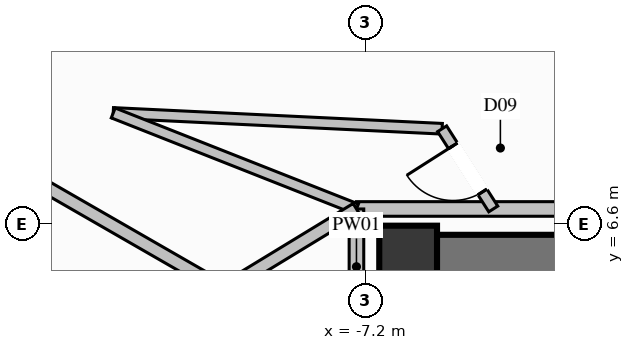
"""IFC4 building model, lengths in metres.
Left out: names, types, materials, properties, quantities, classifications, styles, units other than length and angle.
Written with IfcOpenShell. Run it as: python <this file> out.ifc"""

import sys

from ifc_helpers import new_model, si_unit, direction, frame, frame_2d, origin, origin_2d, place, context, subcontext, project, spatial, rectangle, extrude, element, fill, save


model = new_model("IFC4")
c1 = context("Model", 3, precision=1e-05, world=origin(), true_north=direction((0.0, 1.0)))
c2 = subcontext(c1, "Body", "Model", "MODEL_VIEW")
j1 = project(units=[si_unit("LENGTHUNIT", "METRE"), si_unit("PLANEANGLEUNIT", "RADIAN")], contexts=[c1])
p1 = place(None, origin())
s1 = spatial("IfcSite", under=j1, at=p1, CompositionType="ELEMENT")
p2 = place(p1, origin())
s2 = spatial("IfcBuilding", under=s1, at=p2, CompositionType="ELEMENT")
p3 = place(p2, frame((0.0, 0.0, 117.0)))
s3 = spatial("IfcBuildingStorey", under=s2, at=p3, CompositionType="ELEMENT", Elevation=117.0)
p4 = place(p3, frame((-6.5, 6.1, 0.0), z_axis=(0.0, 0.0, 1.0), x_axis=(1.0, 0.0, 0.0)))
e1 = element("IfcColumn", 1, at=p4, inside=s3, PredefinedType="COLUMN", context=c2, shape_type="SweptSolid", body=[
    extrude(rectangle(XDim=0.95, YDim=0.95, at=origin_2d()), origin(), (0.0, 0.0, 1.0), 3.6),
])
p5 = place(p3, frame((-6.175, 6.1, 0.0), z_axis=(0.0, 0.0, 1.0), x_axis=(1.0, 0.0, 0.0)))
e2 = element("IfcWall", 2, at=p5, inside=s3, PredefinedType="SHEAR", context=c2, shape_type="SweptSolid", body=[
    extrude(rectangle(XDim=2.575, YDim=0.65, at=frame_2d((1.288, 0.0))), origin(), (0.0, 0.0, 1.0), 3.6),
])
p6 = place(p3, frame((-6.5, 2.35, 0.0), z_axis=(0.0, 0.0, 1.0), x_axis=(0.0, 1.0, 0.0)))
e3 = element("IfcWall", 3, at=p6, inside=s3, PredefinedType="SHEAR", context=c2, shape_type="SweptSolid", body=[
    extrude(rectangle(XDim=4.075, YDim=0.65, at=frame_2d((2.038, 0.0))), origin(), (0.0, 0.0, 1.0), 3.6),
])
p7 = place(p3, frame((-7.35, 6.85, 0.0), z_axis=(0.0, 0.0, 1.0), x_axis=(1.0, 0.0, 0.0)))
e4 = element("IfcWall", 4, at=p7, inside=s3, PredefinedType="PARTITIONING", context=c2, shape_type="SweptSolid", body=[
    extrude(rectangle(XDim=14.7, YDim=0.24, at=frame_2d((7.35, 0.0))), origin(), (0.0, 0.0, 1.0), 2.435),
])
p8 = place(p3, frame((-7.35, 4.95, 0.0), z_axis=(0.0, 0.0, 1.0), x_axis=(0.0, 1.0, 0.0)))
e5 = element("IfcWall", 5, at=p8, inside=s3, PredefinedType="PARTITIONING", context=c2, shape_type="SweptSolid", body=[
    extrude(rectangle(XDim=1.9, YDim=0.24, at=frame_2d((0.95, 0.0))), origin(), (0.0, 0.0, 1.0), 2.435),
])
p9 = place(p3, frame((-9.526, 5.525, 0.0), z_axis=(0.0, 0.0, 1.0), x_axis=(-0.866806949329, 0.498643873516, 0.0)))
e6 = element("IfcWall", 6, at=p9, inside=s3, PredefinedType="PARTITIONING", context=c2, shape_type="SweptSolid", body=[
    extrude(rectangle(XDim=5.443, YDim=0.21, at=frame_2d((2.721, 0.0))), origin(), (0.0, 0.0, 1.0), 2.791),
])
p10 = place(p3, frame((-11.35, 8.429, 0.0), z_axis=(0.0, 0.0, 1.0), x_axis=(0.998846720144, -0.048012807228, 0.0)))
e7 = element("IfcWall", 7, at=p10, inside=s3, PredefinedType="PLUMBINGWALL", context=c2, shape_type="SweptSolid", body=[
    extrude(rectangle(XDim=5.416, YDim=0.175, at=frame_2d((2.708, 0.0))), origin(), (0.0, 0.0, 1.0), 3.35),
])
p11 = place(p3, frame((-11.35, 8.429, 0.0), z_axis=(0.0, 0.0, 1.0), x_axis=(0.930162364503, -0.367148438186, 0.0)))
e8 = element("IfcWall", 8, at=p11, inside=s3, PredefinedType="PLUMBINGWALL", context=c2, shape_type="SweptSolid", body=[
    extrude(rectangle(XDim=4.3, YDim=0.175, at=frame_2d((2.15, 0.0))), origin(), (0.0, 0.0, 1.0), 2.791),
])
p12 = place(p3, frame((-5.1, 6.85, 0.0), z_axis=(0.0, 0.0, 1.0), x_axis=(-0.537582310539, 0.843211278029, 0.0)))
e9 = element("IfcWall", 9, at=p12, inside=s3, PredefinedType="PLUMBINGWALL", context=c2, shape_type="SweptSolid", body=[
    extrude(rectangle(XDim=1.564, YDim=0.175, at=frame_2d((0.782, 0.0))), origin(), (0.0, 0.0, 1.0), 3.35),
])
p13 = place(p12, frame((0.332, 0.0, 0.0)))
e10 = element("IfcOpeningElement", 10, at=p13, cuts=e9, PredefinedType="OPENING", context=c2, shape_type="SweptSolid", body=[
    extrude(rectangle(XDim=0.9, YDim=2.1, at=frame_2d((0.45, 1.05))), frame((0.0, 0.098, 0.0), z_axis=(0.0, -1.0, 0.0), x_axis=(1.0, 0.0, 0.0)), (0.0, 0.0, 1.0), 0.195),
])
p14 = place(p3, frame((-9.526, 5.525, 0.0), z_axis=(0.0, 0.0, 1.0), x_axis=(0.854057882133, 0.520177982969, 0.0)))
e11 = element("IfcWall", 11, at=p14, inside=s3, PredefinedType="PARTITIONING", context=c2, shape_type="SweptSolid", body=[
    extrude(rectangle(XDim=2.548, YDim=0.21, at=frame_2d((1.274, 0.0))), origin(), (0.0, 0.0, 1.0), 3.35),
])
p15 = place(p13, origin())
e12 = element("IfcDoor", 12, at=p15, inside=s3, OperationType="SINGLE_SWING_RIGHT", PredefinedType="DOOR", context=c2, shape_type="SweptSolid", body=[
    extrude(rectangle(XDim=0.9, YDim=2.1, at=frame_2d((0.45, 1.05))), frame((0.0, 0.025, 0.0), z_axis=(0.0, -1.0, 0.0), x_axis=(1.0, 0.0, 0.0)), (0.0, 0.0, 1.0), 0.05),
])
fill(e10, e12)
save(model, sys.argv[1])
